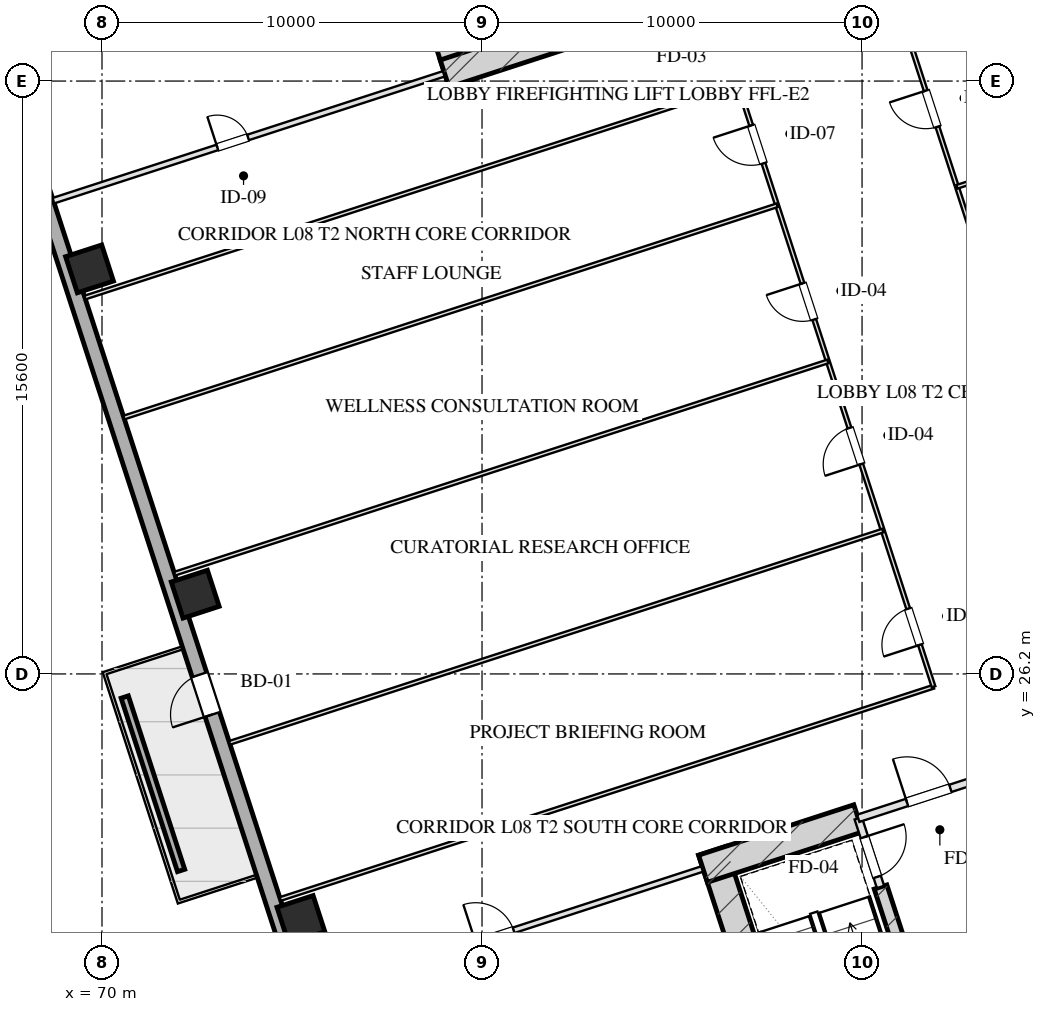
"""IFC4 building model, lengths in metres.
Left out: names, types, materials, properties, quantities, classifications, styles, units other than length and angle.
Written with IfcOpenShell. Run it as: python <this file> out.ifc"""

import sys

from ifc_helpers import new_model, si_unit, direction, frame, frame_2d, origin, origin_2d, place, context, subcontext, project, spatial, rectangle, hollow_rectangle, extrude, element, fill, save


model = new_model("IFC4")
c1 = context("Model", 3, precision=1e-05, world=origin(), true_north=direction((0.0, 1.0)))
c2 = subcontext(c1, "Body", "Model", "MODEL_VIEW")
j1 = project(units=[si_unit("LENGTHUNIT", "METRE"), si_unit("PLANEANGLEUNIT", "RADIAN")], contexts=[c1])
p1 = place(None, origin())
s1 = spatial("IfcSite", under=j1, at=p1, CompositionType="ELEMENT")
p2 = place(p1, origin())
s2 = spatial("IfcBuilding", under=s1, at=p2, CompositionType="ELEMENT")
p3 = place(p2, frame((0.0, 0.0, 38.0)))
s3 = spatial("IfcBuildingStorey", under=s2, at=p3, CompositionType="ELEMENT", Elevation=38.0)
p4 = place(p3, frame((86.055, 21.546, 0.0), z_axis=(0.0, 0.0, 1.0), x_axis=(0.309023585745, -0.951054374604, 0.0)))
e1 = element("IfcWall", 1, at=p4, inside=s3, PredefinedType="SHEAR", context=c2, shape_type="SweptSolid", body=[
    extrude(rectangle(XDim=9.63, YDim=0.75, at=frame_2d((4.815, 0.0))), origin(), (0.0, 0.0, 1.0), 4.0),
])
p5 = place(p3, frame((90.486, 20.594, 0.0), z_axis=(0.0, 0.0, 1.0), x_axis=(0.309020428229, -0.951055400562, 0.0)))
e2 = element("IfcWall", 2, at=p5, inside=s3, PredefinedType="SHEAR", context=c2, shape_type="SweptSolid", body=[
    extrude(rectangle(XDim=6.98, YDim=0.35, at=frame_2d((3.49, 0.0))), origin(), (0.0, 0.0, 1.0), 4.0),
])
p6 = place(p3, frame((85.814, 21.074, 0.0), z_axis=(0.0, 0.0, 1.0), x_axis=(0.95106580992, 0.308988390074, 0.0)))
e3 = element("IfcWall", 3, at=p6, inside=s3, PredefinedType="SHEAR", context=c2, shape_type="SweptSolid", body=[
    extrude(rectangle(XDim=4.295, YDim=0.75, at=frame_2d((2.147, 0.0))), origin(), (0.0, 0.0, 1.0), 4.0),
])
p7 = place(p3, frame((79.489, 41.756, 0.0), z_axis=(0.0, 0.0, 1.0), x_axis=(-0.309016134813, 0.951056795583, 0.0)))
e4 = element("IfcWall", 4, at=p7, inside=s3, PredefinedType="SHEAR", context=c2, shape_type="SweptSolid", body=[
    extrude(rectangle(XDim=9.63, YDim=0.75, at=frame_2d((4.815, 0.0))), origin(), (0.0, 0.0, 1.0), 4.0),
])
p8 = place(p3, frame((79.016, 41.997, 0.0), z_axis=(0.0, 0.0, 1.0), x_axis=(0.95106038264, 0.309005094736, 0.0)))
e5 = element("IfcWall", 5, at=p8, inside=s3, PredefinedType="SHEAR", context=c2, shape_type="SweptSolid", body=[
    extrude(rectangle(XDim=4.295, YDim=0.75, at=frame_2d((2.147, 0.0))), origin(), (0.0, 0.0, 1.0), 4.0),
])
for number, where, z_axis, x_axis in (
    (6, (75.234, 19.739, 0.0), (0.0, 0.0, 1.0), (0.951, 0.309, 0.0)),
    (7, (72.453, 28.299, 0.0), (0.0, 0.0, 1.0), (0.951, 0.309, 0.0)),
    (8, (69.672, 36.858, 0.0), (0.0, 0.0, 1.0), (0.951, 0.309, 0.0)),
):
    element("IfcColumn", number, at=place(p3, frame(where, z_axis=z_axis, x_axis=x_axis)), inside=s3, PredefinedType="COLUMN", context=c2, shape_type="SweptSolid", body=[
        extrude(hollow_rectangle(XDim=1.0, YDim=1.0, WallThickness=0.036, at=origin_2d()), origin(), (0.0, 0.0, 1.0), 4.001),
    ])
p9 = place(p3, frame((79.655, 4.352, 0.0), z_axis=(0.0, 0.0, 1.0), x_axis=(-0.309014526607, 0.951057318118, 0.0)))
e9 = element("IfcWall", 9, at=p9, inside=s3, PredefinedType="SOLIDWALL", context=c2, shape_type="SweptSolid", body=[
    extrude(rectangle(XDim=50.0, YDim=0.4, at=frame_2d((25.0, 0.0))), origin(), (0.0, 0.0, 1.0), 3.16),
])
p10 = place(p9, frame((21.85, 0.0, 0.0)))
e10 = element("IfcOpeningElement", 10, at=p10, cuts=e9, PredefinedType="OPENING", context=c2, shape_type="SweptSolid", body=[
    extrude(rectangle(XDim=1.1, YDim=2.15, at=frame_2d((0.55, 1.075))), frame((0.0, 0.21, 0.0), z_axis=(0.0, -1.0, 0.0), x_axis=(1.0, 0.0, 0.0)), (0.0, 0.0, 1.0), 0.42),
])
p11 = place(p3, frame((72.082, 21.028, 0.0), z_axis=(0.0, 0.0, 1.0), x_axis=(-0.30900096172, 0.951061725471, 0.0)))
e11 = element("IfcWall", 11, at=p11, inside=s3, PredefinedType="PARAPET", context=c2, shape_type="SweptSolid", body=[
    extrude(rectangle(XDim=4.8, YDim=0.2, at=frame_2d((2.4, 0.0))), origin(), (0.0, 0.0, 1.0), 0.75),
])
p12 = place(p3, frame((89.899, 22.401, 0.0), z_axis=(0.0, 0.0, 1.0), x_axis=(0.308932062672, -0.951084108086, 0.0)))
e12 = element("IfcWall", 12, at=p12, inside=s3, PredefinedType="PARTITIONING", context=c2, shape_type="SweptSolid", body=[
    extrude(rectangle(XDim=1.9, YDim=0.2, at=frame_2d((0.95, 0.0))), origin(), (0.0, 0.0, 1.0), 3.725),
])
p13 = place(p12, frame((0.52, 0.0, 0.0)))
e13 = element("IfcOpeningElement", 13, at=p13, cuts=e12, PredefinedType="OPENING", context=c2, shape_type="SweptSolid", body=[
    extrude(rectangle(XDim=1.1, YDim=2.05, at=frame_2d((0.55, 1.025))), frame((0.0, 0.11, 0.0), z_axis=(0.0, -1.0, 0.0), x_axis=(1.0, 0.0, 0.0)), (0.0, 0.0, 1.0), 0.22),
])
p14 = place(p3, frame((89.899, 22.401, 0.0), z_axis=(0.0, 0.0, 1.0), x_axis=(0.951046716504, 0.309047153403, 0.0)))
e14 = element("IfcWall", 14, at=p14, inside=s3, PredefinedType="PARTITIONING", context=c2, shape_type="SweptSolid", body=[
    extrude(rectangle(XDim=3.83, YDim=0.2, at=frame_2d((1.915, 0.0))), origin(), (0.0, 0.0, 1.0), 3.725),
])
p15 = place(p14, frame((1.35, 0.0, 0.0)))
e15 = element("IfcOpeningElement", 15, at=p15, cuts=e14, PredefinedType="OPENING", context=c2, shape_type="SweptSolid", body=[
    extrude(rectangle(XDim=1.2, YDim=2.05, at=frame_2d((0.6, 1.025))), frame((0.0, 0.11, 0.0), z_axis=(0.0, -1.0, 0.0), x_axis=(1.0, 0.0, 0.0)), (0.0, 0.0, 1.0), 0.22),
])
p16 = place(p3, frame((75.519, 17.729, 0.0), z_axis=(0.0, 0.0, 1.0), x_axis=(0.951056658866, 0.309016555588, 0.0)))
e16 = element("IfcWall", 16, at=p16, inside=s3, PredefinedType="PARTITIONING", context=c2, shape_type="SweptSolid", body=[
    extrude(rectangle(XDim=10.8, YDim=0.15, at=frame_2d((5.4, 0.0))), origin(), (0.0, 0.0, 1.0), 3.725),
])
p17 = place(p16, frame((4.536, 0.0, 0.0)))
e17 = element("IfcOpeningElement", 17, at=p17, cuts=e16, PredefinedType="OPENING", context=c2, shape_type="SweptSolid", body=[
    extrude(rectangle(XDim=1.05, YDim=2.05, at=frame_2d((0.525, 1.025))), frame((0.0, 0.085, 0.0), z_axis=(0.0, -1.0, 0.0), x_axis=(1.0, 0.0, 0.0)), (0.0, 0.0, 1.0), 0.17),
])
p18 = place(p3, frame((68.721, 38.652, 0.0), z_axis=(0.0, 0.0, 1.0), x_axis=(0.951056658866, 0.309016555588, 0.0)))
e18 = element("IfcWall", 18, at=p18, inside=s3, PredefinedType="PARTITIONING", context=c2, shape_type="SweptSolid", body=[
    extrude(rectangle(XDim=10.8, YDim=0.15, at=frame_2d((5.4, 0.0))), origin(), (0.0, 0.0, 1.0), 3.725),
])
p19 = place(p18, frame((4.536, 0.0, 0.0)))
e19 = element("IfcOpeningElement", 19, at=p19, cuts=e18, PredefinedType="OPENING", context=c2, shape_type="SweptSolid", body=[
    extrude(rectangle(XDim=0.85, YDim=2.05, at=frame_2d((0.425, 1.025))), frame((0.0, 0.085, 0.0), z_axis=(0.0, -1.0, 0.0), x_axis=(1.0, 0.0, 0.0)), (0.0, 0.0, 1.0), 0.17),
])
p20 = place(p3, frame((74.691, 20.278, 0.0), z_axis=(0.0, 0.0, 1.0), x_axis=(0.951053521786, 0.309026210375, 0.0)))
e20 = element("IfcWall", 20, at=p20, inside=s3, PredefinedType="MOVABLE", context=c2, shape_type="SweptSolid", body=[
    extrude(rectangle(XDim=18.075, YDim=0.1, at=frame_2d((9.038, 0.0))), origin(), (0.0, 0.0, 1.0), 3.725),
])
p21 = place(p3, frame((69.549, 36.103, 0.0), z_axis=(0.0, 0.0, 1.0), x_axis=(0.951057491432, 0.309013993197, 0.0)))
e21 = element("IfcWall", 21, at=p21, inside=s3, PredefinedType="MOVABLE", context=c2, shape_type="SweptSolid", body=[
    extrude(rectangle(XDim=18.075, YDim=0.1, at=frame_2d((9.038, 0.0))), origin(), (0.0, 0.0, 1.0), 3.725),
])
p22 = place(p3, frame((91.882, 25.863, 0.0), z_axis=(0.0, 0.0, 1.0), x_axis=(-0.309022042254, 0.951054876125, 0.0)))
e22 = element("IfcWall", 22, at=p22, inside=s3, PredefinedType="MOVABLE", context=c2, shape_type="SweptSolid", body=[
    extrude(rectangle(XDim=16.64, YDim=0.1, at=frame_2d((8.32, 0.0))), origin(), (0.0, 0.0, 1.0), 3.725),
])
p23 = place(p22, frame((1.16, 0.0, 0.0)))
e23 = element("IfcOpeningElement", 23, at=p23, cuts=e22, PredefinedType="OPENING", context=c2, shape_type="SweptSolid", body=[
    extrude(rectangle(XDim=1.0, YDim=2.05, at=frame_2d((0.5, 1.025))), frame((0.0, 0.06, 0.0), z_axis=(0.0, -1.0, 0.0), x_axis=(1.0, 0.0, 0.0)), (0.0, 0.0, 1.0), 0.12),
])
p24 = place(p22, frame((6.16, 0.0, 0.0)))
e24 = element("IfcOpeningElement", 24, at=p24, cuts=e22, PredefinedType="OPENING", context=c2, shape_type="SweptSolid", body=[
    extrude(rectangle(XDim=1.0, YDim=2.05, at=frame_2d((0.5, 1.025))), frame((0.0, 0.06, 0.0), z_axis=(0.0, -1.0, 0.0), x_axis=(1.0, 0.0, 0.0)), (0.0, 0.0, 1.0), 0.12),
])
p25 = place(p22, frame((10.16, 0.0, 0.0)))
e25 = element("IfcOpeningElement", 25, at=p25, cuts=e22, PredefinedType="OPENING", context=c2, shape_type="SweptSolid", body=[
    extrude(rectangle(XDim=1.0, YDim=2.05, at=frame_2d((0.5, 1.025))), frame((0.0, 0.06, 0.0), z_axis=(0.0, -1.0, 0.0), x_axis=(1.0, 0.0, 0.0)), (0.0, 0.0, 1.0), 0.12),
])
p26 = place(p22, frame((14.48, 0.0, 0.0)))
e26 = element("IfcOpeningElement", 26, at=p26, cuts=e22, PredefinedType="OPENING", context=c2, shape_type="SweptSolid", body=[
    extrude(rectangle(XDim=1.05, YDim=2.05, at=frame_2d((0.525, 1.025))), frame((0.0, 0.06, 0.0), z_axis=(0.0, -1.0, 0.0), x_axis=(1.0, 0.0, 0.0)), (0.0, 0.0, 1.0), 0.12),
])
p27 = place(p3, frame((96.304, 27.3, 0.0), z_axis=(0.0, 0.0, 1.0), x_axis=(-0.30901773025, 0.951056277195, 0.0)))
e27 = element("IfcWall", 27, at=p27, inside=s3, PredefinedType="MOVABLE", context=c2, shape_type="SweptSolid", body=[
    extrude(rectangle(XDim=16.64, YDim=0.1, at=frame_2d((8.32, 0.0))), origin(), (0.0, 0.0, 1.0), 3.725),
])
p28 = place(p27, frame((1.66, 0.0, 0.0)))
e28 = element("IfcOpeningElement", 28, at=p28, cuts=e27, PredefinedType="OPENING", context=c2, shape_type="SweptSolid", body=[
    extrude(rectangle(XDim=1.0, YDim=2.05, at=frame_2d((0.5, 1.025))), frame((0.0, 0.06, 0.0), z_axis=(0.0, -1.0, 0.0), x_axis=(1.0, 0.0, 0.0)), (0.0, 0.0, 1.0), 0.12),
])
p29 = place(p27, frame((7.82, 0.0, 0.0)))
e29 = element("IfcOpeningElement", 29, at=p29, cuts=e27, PredefinedType="OPENING", context=c2, shape_type="SweptSolid", body=[
    extrude(rectangle(XDim=1.0, YDim=2.05, at=frame_2d((0.5, 1.025))), frame((0.0, 0.06, 0.0), z_axis=(0.0, -1.0, 0.0), x_axis=(1.0, 0.0, 0.0)), (0.0, 0.0, 1.0), 0.12),
])
p30 = place(p27, frame((13.98, 0.0, 0.0)))
e30 = element("IfcOpeningElement", 30, at=p30, cuts=e27, PredefinedType="OPENING", context=c2, shape_type="SweptSolid", body=[
    extrude(rectangle(XDim=1.0, YDim=2.05, at=frame_2d((0.5, 1.025))), frame((0.0, 0.06, 0.0), z_axis=(0.0, -1.0, 0.0), x_axis=(1.0, 0.0, 0.0)), (0.0, 0.0, 1.0), 0.12),
])
for number, where, z_axis, x_axis in (
    (31, (73.356, 24.386, 0.0), (0.0, 0.0, 1.0), (0.951, 0.309, 0.0)),
    (32, (71.91, 28.837, 0.0), (0.0, 0.0, 1.0), (0.951, 0.309, 0.0)),
    (33, (70.575, 32.946, 0.0), (0.0, 0.0, 1.0), (0.951, 0.309, 0.0)),
):
    element("IfcWall", number, at=place(p3, frame(where, z_axis=z_axis, x_axis=x_axis)), inside=s3, PredefinedType="MOVABLE", context=c2, shape_type="SweptSolid", body=[
        extrude(rectangle(XDim=18.075, YDim=0.1, at=frame_2d((9.038, 0.0))), origin(), (0.0, 0.0, 1.0), 3.725),
    ])
p31 = place(p3, frame((92.497, 39.017, 0.0), z_axis=(0.0, 0.0, 1.0), x_axis=(0.951055535739, 0.309020012199, 0.0)))
e34 = element("IfcWall", 34, at=p31, inside=s3, PredefinedType="MOVABLE", context=c2, shape_type="SweptSolid", body=[
    extrude(rectangle(XDim=14.875, YDim=0.1, at=frame_2d((7.438, 0.0))), origin(), (0.0, 0.0, 1.0), 3.725),
])
p32 = place(p10, origin())
e35 = element("IfcDoor", 35, at=p32, inside=s3, OperationType="SINGLE_SWING_LEFT", PredefinedType="DOOR", context=c2, shape_type="SweptSolid", body=[
    extrude(rectangle(XDim=1.1, YDim=2.15, at=frame_2d((0.55, 1.075))), frame((0.0, 0.025, 0.0), z_axis=(0.0, -1.0, 0.0), x_axis=(1.0, 0.0, 0.0)), (0.0, 0.0, 1.0), 0.05),
])
fill(e10, e35)
p33 = place(p13, origin())
e36 = element("IfcDoor", 36, at=p33, inside=s3, OperationType="SINGLE_SWING_LEFT", PredefinedType="DOOR", context=c2, shape_type="SweptSolid", body=[
    extrude(rectangle(XDim=1.1, YDim=2.05, at=frame_2d((0.55, 1.025))), frame((0.0, 0.025, 0.0), z_axis=(0.0, -1.0, 0.0), x_axis=(1.0, 0.0, 0.0)), (0.0, 0.0, 1.0), 0.05),
])
fill(e13, e36)
p34 = place(p15, origin())
e37 = element("IfcDoor", 37, at=p34, inside=s3, OperationType="SINGLE_SWING_LEFT", PredefinedType="DOOR", context=c2, shape_type="SweptSolid", body=[
    extrude(rectangle(XDim=1.2, YDim=2.05, at=frame_2d((0.6, 1.025))), frame((0.0, 0.025, 0.0), z_axis=(0.0, -1.0, 0.0), x_axis=(1.0, 0.0, 0.0)), (0.0, 0.0, 1.0), 0.05),
])
fill(e15, e37)
p35 = place(p17, origin())
e38 = element("IfcDoor", 38, at=p35, inside=s3, OperationType="SINGLE_SWING_LEFT", PredefinedType="DOOR", context=c2, shape_type="SweptSolid", body=[
    extrude(rectangle(XDim=1.05, YDim=2.05, at=frame_2d((0.525, 1.025))), frame((0.0, 0.025, 0.0), z_axis=(0.0, -1.0, 0.0), x_axis=(1.0, 0.0, 0.0)), (0.0, 0.0, 1.0), 0.05),
])
fill(e17, e38)
p36 = place(p19, origin())
e39 = element("IfcDoor", 39, at=p36, inside=s3, OperationType="SINGLE_SWING_LEFT", PredefinedType="DOOR", context=c2, shape_type="SweptSolid", body=[
    extrude(rectangle(XDim=0.85, YDim=2.05, at=frame_2d((0.425, 1.025))), frame((0.0, 0.025, 0.0), z_axis=(0.0, -1.0, 0.0), x_axis=(1.0, 0.0, 0.0)), (0.0, 0.0, 1.0), 0.05),
])
fill(e19, e39)
p37 = place(p23, origin())
e40 = element("IfcDoor", 40, at=p37, inside=s3, OperationType="SINGLE_SWING_LEFT", PredefinedType="DOOR", context=c2, shape_type="SweptSolid", body=[
    extrude(rectangle(XDim=1.0, YDim=2.05, at=frame_2d((0.5, 1.025))), frame((0.0, 0.025, 0.0), z_axis=(0.0, -1.0, 0.0), x_axis=(1.0, 0.0, 0.0)), (0.0, 0.0, 1.0), 0.05),
])
fill(e23, e40)
p38 = place(p24, origin())
e41 = element("IfcDoor", 41, at=p38, inside=s3, OperationType="SINGLE_SWING_LEFT", PredefinedType="DOOR", context=c2, shape_type="SweptSolid", body=[
    extrude(rectangle(XDim=1.0, YDim=2.05, at=frame_2d((0.5, 1.025))), frame((0.0, 0.025, 0.0), z_axis=(0.0, -1.0, 0.0), x_axis=(1.0, 0.0, 0.0)), (0.0, 0.0, 1.0), 0.05),
])
fill(e24, e41)
p39 = place(p25, origin())
e42 = element("IfcDoor", 42, at=p39, inside=s3, OperationType="SINGLE_SWING_RIGHT", PredefinedType="DOOR", context=c2, shape_type="SweptSolid", body=[
    extrude(rectangle(XDim=1.0, YDim=2.05, at=frame_2d((0.5, 1.025))), frame((0.0, 0.025, 0.0), z_axis=(0.0, -1.0, 0.0), x_axis=(1.0, 0.0, 0.0)), (0.0, 0.0, 1.0), 0.05),
])
fill(e25, e42)
p40 = place(p26, origin())
e43 = element("IfcDoor", 43, at=p40, inside=s3, OperationType="SINGLE_SWING_RIGHT", PredefinedType="DOOR", context=c2, shape_type="SweptSolid", body=[
    extrude(rectangle(XDim=1.05, YDim=2.05, at=frame_2d((0.525, 1.025))), frame((0.0, 0.025, 0.0), z_axis=(0.0, -1.0, 0.0), x_axis=(1.0, 0.0, 0.0)), (0.0, 0.0, 1.0), 0.05),
])
fill(e26, e43)
p41 = place(p30, origin())
e44 = element("IfcDoor", 44, at=p41, inside=s3, OperationType="SINGLE_SWING_RIGHT", PredefinedType="DOOR", context=c2, shape_type="SweptSolid", body=[
    extrude(rectangle(XDim=1.0, YDim=2.05, at=frame_2d((0.5, 1.025))), frame((0.0, 0.025, 0.0), z_axis=(0.0, -1.0, 0.0), x_axis=(1.0, 0.0, 0.0)), (0.0, 0.0, 1.0), 0.05),
])
fill(e30, e44)
save(model, sys.argv[1])
